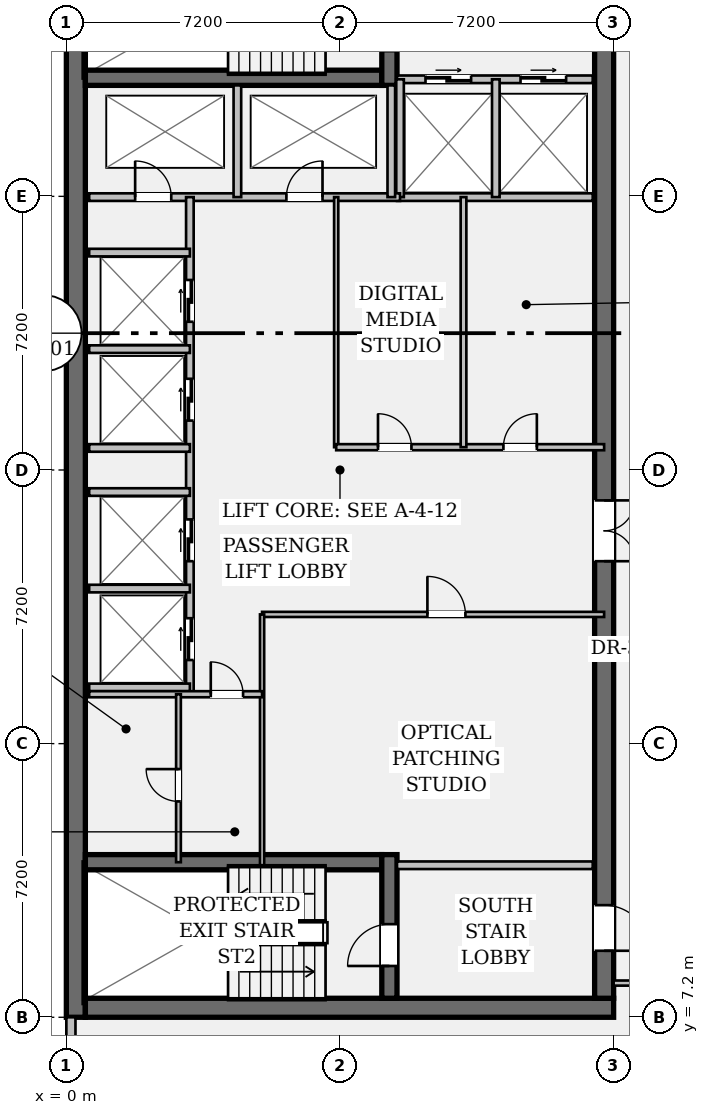
"""IFC4 building model, lengths in metres.
Left out: names, types, materials, properties, quantities, classifications, styles, units other than length and angle.
Written with IfcOpenShell. Run it as: python <this file> out.ifc"""

import sys

from ifc_helpers import new_model, si_unit, direction, frame, frame_2d, origin, place, context, subcontext, project, spatial, rectangle, extrude, element, fill, save


model = new_model("IFC4")
c1 = context("Model", 3, precision=1e-05, world=origin(), true_north=direction((0.0, 1.0)))
c2 = subcontext(c1, "Body", "Model", "MODEL_VIEW")
j1 = project(units=[si_unit("LENGTHUNIT", "METRE"), si_unit("PLANEANGLEUNIT", "RADIAN")], contexts=[c1])
p1 = place(None, origin())
s1 = spatial("IfcSite", under=j1, at=p1, CompositionType="ELEMENT")
p2 = place(p1, origin())
s2 = spatial("IfcBuilding", under=s1, at=p2, CompositionType="ELEMENT")
p3 = place(p2, frame((0.0, 0.0, 225.75)))
s3 = spatial("IfcBuildingStorey", under=s2, at=p3, CompositionType="ELEMENT", Elevation=225.75)
p4 = place(p3, frame((0.25, 7.2, 0.0), z_axis=(0.0, 0.0, 1.0), x_axis=(0.0, 1.0, 0.0)))
e1 = element("IfcWall", 1, at=p4, inside=s3, PredefinedType="SHEAR", context=c2, shape_type="SweptSolid", body=[
    extrude(rectangle(XDim=28.8, YDim=0.5, at=frame_2d((14.4, 0.0))), origin(), (0.0, 0.0, 1.0), 3.24),
])
p5 = place(p3, frame((0.5, 7.45, 0.0), z_axis=(0.0, 0.0, 1.0), x_axis=(1.0, 0.0, 0.0)))
e2 = element("IfcWall", 2, at=p5, inside=s3, PredefinedType="SHEAR", context=c2, shape_type="SweptSolid", body=[
    extrude(rectangle(XDim=13.9, YDim=0.5, at=frame_2d((6.95, 0.0))), origin(), (0.0, 0.0, 1.0), 3.24),
])
p6 = place(p3, frame((14.15, 35.5, 0.0), z_axis=(0.0, 0.0, 1.0), x_axis=(0.0, -1.0, 0.0)))
e3 = element("IfcWall", 3, at=p6, inside=s3, PredefinedType="SHEAR", context=c2, shape_type="SweptSolid", body=[
    extrude(rectangle(XDim=27.8, YDim=0.5, at=frame_2d((13.9, 0.0))), origin(), (0.0, 0.0, 1.0), 3.24),
])
p7 = place(p6, frame((1.4, 0.0, 0.0)))
e4 = element("IfcOpeningElement", 4, at=p7, cuts=e3, PredefinedType="OPENING", context=c2, shape_type="SweptSolid", body=[
    extrude(rectangle(XDim=1.2, YDim=2.15, at=frame_2d((0.6, 1.075))), frame((0.0, 0.262, 0.0), z_axis=(0.0, -1.0, 0.0), x_axis=(1.0, 0.0, 0.0)), (0.0, 0.0, 1.0), 0.524),
])
p8 = place(p6, frame((25.35, 0.0, 0.0)))
e5 = element("IfcOpeningElement", 5, at=p8, cuts=e3, PredefinedType="OPENING", context=c2, shape_type="SweptSolid", body=[
    extrude(rectangle(XDim=1.2, YDim=2.15, at=frame_2d((0.6, 1.075))), frame((0.0, 0.262, 0.0), z_axis=(0.0, -1.0, 0.0), x_axis=(1.0, 0.0, 0.0)), (0.0, 0.0, 1.0), 0.524),
])
p9 = place(p6, frame((14.7, 0.0, 0.0)))
e6 = element("IfcOpeningElement", 6, at=p9, cuts=e3, PredefinedType="OPENING", context=c2, shape_type="SweptSolid", body=[
    extrude(rectangle(XDim=1.6, YDim=2.2, at=frame_2d((0.8, 1.1))), frame((0.0, 0.262, 0.0), z_axis=(0.0, -1.0, 0.0), x_axis=(1.0, 0.0, 0.0)), (0.0, 0.0, 1.0), 0.524),
])
for number, where, z_axis, x_axis in (
    (7, (0.5, 31.92, 0.0), (0.0, 0.0, 1.0), (1.0, 0.0, 0.0)),
    (8, (0.5, 11.28, 0.0), (0.0, 0.0, 1.0), (1.0, 0.0, 0.0)),
):
    element("IfcWall", number, at=place(p3, frame(where, z_axis=z_axis, x_axis=x_axis)), inside=s3, PredefinedType="SHEAR", context=c2, shape_type="SweptSolid", body=[
        extrude(rectangle(XDim=7.8, YDim=0.4, at=frame_2d((3.9, 0.0))), origin(), (0.0, 0.0, 1.0), 3.24),
    ])
p10 = place(p3, frame((8.5, 31.72, 0.0), z_axis=(0.0, 0.0, 1.0), x_axis=(0.0, 1.0, 0.0)))
e9 = element("IfcWall", 9, at=p10, inside=s3, PredefinedType="SHEAR", context=c2, shape_type="SweptSolid", body=[
    extrude(rectangle(XDim=3.78, YDim=0.4, at=frame_2d((1.89, 0.0))), origin(), (0.0, 0.0, 1.0), 3.24),
])
p11 = place(p10, frame((0.9, 0.0, 0.0)))
e10 = element("IfcOpeningElement", 10, at=p11, cuts=e9, PredefinedType="OPENING", context=c2, shape_type="SweptSolid", body=[
    extrude(rectangle(XDim=1.1, YDim=2.15, at=frame_2d((0.55, 1.075))), frame((0.0, 0.212, 0.0), z_axis=(0.0, -1.0, 0.0), x_axis=(1.0, 0.0, 0.0)), (0.0, 0.0, 1.0), 0.424),
])
p12 = place(p3, frame((8.5, 7.7, 0.0), z_axis=(0.0, 0.0, 1.0), x_axis=(0.0, 1.0, 0.0)))
e11 = element("IfcWall", 11, at=p12, inside=s3, PredefinedType="SHEAR", context=c2, shape_type="SweptSolid", body=[
    extrude(rectangle(XDim=3.78, YDim=0.4, at=frame_2d((1.89, 0.0))), origin(), (0.0, 0.0, 1.0), 3.24),
])
p13 = place(p12, frame((0.85, 0.0, 0.0)))
e12 = element("IfcOpeningElement", 12, at=p13, cuts=e11, PredefinedType="OPENING", context=c2, shape_type="SweptSolid", body=[
    extrude(rectangle(XDim=1.1, YDim=2.15, at=frame_2d((0.55, 1.075))), frame((0.0, 0.212, 0.0), z_axis=(0.0, -1.0, 0.0), x_axis=(1.0, 0.0, 0.0)), (0.0, 0.0, 1.0), 0.424),
])
p14 = place(p3, frame((0.12, 6.03, 0.0), z_axis=(0.0, 0.0, 1.0), x_axis=(0.0, 1.0, 0.0)))
e13 = element("IfcWall", 13, at=p14, inside=s3, PredefinedType="STANDARD", context=c2, shape_type="SweptSolid", body=[
    extrude(rectangle(XDim=1.17, YDim=0.24, at=frame_2d((0.585, 0.0))), origin(), (0.0, 0.0, 1.0), 3.24),
])
p15 = place(p3, frame((8.7, 31.88, 0.0), z_axis=(0.0, 0.0, 1.0), x_axis=(1.0, 0.0, 0.0)))
e14 = element("IfcWall", 14, at=p15, inside=s3, PredefinedType="PARTITIONING", context=c2, shape_type="SweptSolid", body=[
    extrude(rectangle(XDim=5.15, YDim=0.2, at=frame_2d((2.575, 0.0))), origin(), (0.0, 0.0, 1.0), 3.24),
])
p16 = place(p15, frame((0.75, 0.0, 0.0)))
e15 = element("IfcOpeningElement", 15, at=p16, cuts=e14, PredefinedType="OPENING", context=c2, shape_type="SweptSolid", body=[
    extrude(rectangle(XDim=1.2, YDim=2.2, at=frame_2d((0.6, 1.1))), frame((0.0, 0.112, 0.0), z_axis=(0.0, -1.0, 0.0), x_axis=(1.0, 0.0, 0.0)), (0.0, 0.0, 1.0), 0.224),
])
p17 = place(p15, frame((3.25, 0.0, 0.0)))
e16 = element("IfcOpeningElement", 16, at=p17, cuts=e14, PredefinedType="OPENING", context=c2, shape_type="SweptSolid", body=[
    extrude(rectangle(XDim=1.2, YDim=2.2, at=frame_2d((0.6, 1.1))), frame((0.0, 0.112, 0.0), z_axis=(0.0, -1.0, 0.0), x_axis=(1.0, 0.0, 0.0)), (0.0, 0.0, 1.0), 0.224),
])
for number, where, z_axis, x_axis in (
    (17, (8.7, 11.2, 0.0), (0.0, 0.0, 1.0), (1.0, 0.0, 0.0)),
    (18, (8.7, 28.78, 0.0), (0.0, 0.0, 1.0), (1.0, 0.0, 0.0)),
):
    element("IfcWall", number, at=place(p3, frame(where, z_axis=z_axis, x_axis=x_axis)), inside=s3, PredefinedType="PARTITIONING", context=c2, shape_type="SweptSolid", body=[
        extrude(rectangle(XDim=5.15, YDim=0.2, at=frame_2d((2.575, 0.0))), origin(), (0.0, 0.0, 1.0), 3.24),
    ])
for number, where, z_axis, x_axis in (
    (19, (8.78, 28.78, 0.0), (0.0, 0.0, 1.0), (0.0, 1.0, 0.0)),
    (20, (11.3, 28.78, 0.0), (0.0, 0.0, 1.0), (0.0, 1.0, 0.0)),
):
    element("IfcWall", number, at=place(p3, frame(where, z_axis=z_axis, x_axis=x_axis)), inside=s3, PredefinedType="PARTITIONING", context=c2, shape_type="SweptSolid", body=[
        extrude(rectangle(XDim=3.1, YDim=0.2, at=frame_2d((1.55, 0.0))), origin(), (0.0, 0.0, 1.0), 3.24),
    ])
p18 = place(p3, frame((0.6, 28.78, 0.0), z_axis=(0.0, 0.0, 1.0), x_axis=(1.0, 0.0, 0.0)))
e21 = element("IfcWall", 21, at=p18, inside=s3, PredefinedType="PARTITIONING", context=c2, shape_type="SweptSolid", body=[
    extrude(rectangle(XDim=8.18, YDim=0.2, at=frame_2d((4.09, 0.0))), origin(), (0.0, 0.0, 1.0), 3.24),
])
p19 = place(p18, frame((1.21, 0.0, 0.0)))
e22 = element("IfcOpeningElement", 22, at=p19, cuts=e21, PredefinedType="OPENING", context=c2, shape_type="SweptSolid", body=[
    extrude(rectangle(XDim=0.95, YDim=2.15, at=frame_2d((0.475, 1.075))), frame((0.0, 0.112, 0.0), z_axis=(0.0, -1.0, 0.0), x_axis=(1.0, 0.0, 0.0)), (0.0, 0.0, 1.0), 0.224),
])
p20 = place(p18, frame((5.19, 0.0, 0.0)))
e23 = element("IfcOpeningElement", 23, at=p20, cuts=e21, PredefinedType="OPENING", context=c2, shape_type="SweptSolid", body=[
    extrude(rectangle(XDim=0.95, YDim=2.15, at=frame_2d((0.475, 1.075))), frame((0.0, 0.112, 0.0), z_axis=(0.0, -1.0, 0.0), x_axis=(1.0, 0.0, 0.0)), (0.0, 0.0, 1.0), 0.224),
])
for number, where, z_axis, x_axis in (
    (24, (4.5, 28.78, 0.0), (0.0, 0.0, 1.0), (0.0, 1.0, 0.0)),
    (25, (8.55, 28.78, 0.0), (0.0, 0.0, 1.0), (0.0, 1.0, 0.0)),
):
    element("IfcWall", number, at=place(p3, frame(where, z_axis=z_axis, x_axis=x_axis)), inside=s3, PredefinedType="PARTITIONING", context=c2, shape_type="SweptSolid", body=[
        extrude(rectangle(XDim=2.94, YDim=0.2, at=frame_2d((1.47, 0.0))), origin(), (0.0, 0.0, 1.0), 3.24),
    ])
p21 = place(p3, frame((3.25, 15.7, 0.0), z_axis=(0.0, 0.0, 1.0), x_axis=(0.0, 1.0, 0.0)))
e26 = element("IfcWall", 26, at=p21, inside=s3, PredefinedType="PARTITIONING", context=c2, shape_type="SweptSolid", body=[
    extrude(rectangle(XDim=13.08, YDim=0.2, at=frame_2d((6.54, 0.0))), origin(), (0.0, 0.0, 1.0), 3.24),
])
p22 = place(p21, frame((0.9, 0.0, 0.0)))
e27 = element("IfcOpeningElement", 27, at=p22, cuts=e26, PredefinedType="OPENING", context=c2, shape_type="SweptSolid", body=[
    extrude(rectangle(XDim=1.1, YDim=2.2, at=frame_2d((0.55, 1.1))), frame((0.0, 0.112, 0.0), z_axis=(0.0, -1.0, 0.0), x_axis=(1.0, 0.0, 0.0)), (0.0, 0.0, 1.0), 0.224),
])
p23 = place(p21, frame((3.5, 0.0, 0.0)))
e28 = element("IfcOpeningElement", 28, at=p23, cuts=e26, PredefinedType="OPENING", context=c2, shape_type="SweptSolid", body=[
    extrude(rectangle(XDim=1.1, YDim=2.2, at=frame_2d((0.55, 1.1))), frame((0.0, 0.112, 0.0), z_axis=(0.0, -1.0, 0.0), x_axis=(1.0, 0.0, 0.0)), (0.0, 0.0, 1.0), 0.224),
])
p24 = place(p21, frame((7.2, 0.0, 0.0)))
e29 = element("IfcOpeningElement", 29, at=p24, cuts=e26, PredefinedType="OPENING", context=c2, shape_type="SweptSolid", body=[
    extrude(rectangle(XDim=1.1, YDim=2.2, at=frame_2d((0.55, 1.1))), frame((0.0, 0.112, 0.0), z_axis=(0.0, -1.0, 0.0), x_axis=(1.0, 0.0, 0.0)), (0.0, 0.0, 1.0), 0.224),
])
p25 = place(p21, frame((9.8, 0.0, 0.0)))
e30 = element("IfcOpeningElement", 30, at=p25, cuts=e26, PredefinedType="OPENING", context=c2, shape_type="SweptSolid", body=[
    extrude(rectangle(XDim=1.1, YDim=2.2, at=frame_2d((0.55, 1.1))), frame((0.0, 0.112, 0.0), z_axis=(0.0, -1.0, 0.0), x_axis=(1.0, 0.0, 0.0)), (0.0, 0.0, 1.0), 0.224),
])
for number, where, z_axis, x_axis in (
    (31, (0.6, 15.88, 0.0), (0.0, 0.0, 1.0), (1.0, 0.0, 0.0)),
    (32, (0.6, 18.48, 0.0), (0.0, 0.0, 1.0), (1.0, 0.0, 0.0)),
    (33, (0.6, 22.18, 0.0), (0.0, 0.0, 1.0), (1.0, 0.0, 0.0)),
    (34, (0.6, 24.78, 0.0), (0.0, 0.0, 1.0), (1.0, 0.0, 0.0)),
    (35, (0.6, 21.02, 0.0), (0.0, 0.0, 1.0), (1.0, 0.0, 0.0)),
    (36, (0.6, 27.32, 0.0), (0.0, 0.0, 1.0), (1.0, 0.0, 0.0)),
):
    element("IfcWall", number, at=place(p3, frame(where, z_axis=z_axis, x_axis=x_axis)), inside=s3, PredefinedType="PARTITIONING", context=c2, shape_type="SweptSolid", body=[
        extrude(rectangle(XDim=2.65, YDim=0.2, at=frame_2d((1.325, 0.0))), origin(), (0.0, 0.0, 1.0), 3.24),
    ])
p26 = place(p3, frame((7.1, 22.2, 0.0), z_axis=(0.0, 0.0, 1.0), x_axis=(0.0, 1.0, 0.0)))
e37 = element("IfcWall", 37, at=p26, inside=s3, PredefinedType="PARTITIONING", context=c2, shape_type="SweptSolid", body=[
    extrude(rectangle(XDim=6.58, YDim=0.11, at=frame_2d((3.29, 0.0))), origin(), (0.0, 0.0, 1.0), 3.24),
])
p27 = place(p3, frame((7.1, 22.2, 0.0), z_axis=(0.0, 0.0, 1.0), x_axis=(1.0, 0.0, 0.0)))
e38 = element("IfcWall", 38, at=p27, inside=s3, PredefinedType="PARTITIONING", context=c2, shape_type="SweptSolid", body=[
    extrude(rectangle(XDim=7.05, YDim=0.16, at=frame_2d((3.525, 0.0))), origin(), (0.0, 0.0, 1.0), 3.24),
])
p28 = place(p27, frame((1.1, 0.0, 0.0)))
e39 = element("IfcOpeningElement", 39, at=p28, cuts=e38, PredefinedType="OPENING", context=c2, shape_type="SweptSolid", body=[
    extrude(rectangle(XDim=0.88, YDim=2.15, at=frame_2d((0.44, 1.075))), frame((0.0, 0.092, 0.0), z_axis=(0.0, -1.0, 0.0), x_axis=(1.0, 0.0, 0.0)), (0.0, 0.0, 1.0), 0.184),
])
p29 = place(p27, frame((4.4, 0.0, 0.0)))
e40 = element("IfcOpeningElement", 40, at=p29, cuts=e38, PredefinedType="OPENING", context=c2, shape_type="SweptSolid", body=[
    extrude(rectangle(XDim=0.88, YDim=2.15, at=frame_2d((0.44, 1.075))), frame((0.0, 0.092, 0.0), z_axis=(0.0, -1.0, 0.0), x_axis=(1.0, 0.0, 0.0)), (0.0, 0.0, 1.0), 0.184),
])
p30 = place(p3, frame((10.45, 22.2, 0.0), z_axis=(0.0, 0.0, 1.0), x_axis=(0.0, 1.0, 0.0)))
e41 = element("IfcWall", 41, at=p30, inside=s3, PredefinedType="PARTITIONING", context=c2, shape_type="SweptSolid", body=[
    extrude(rectangle(XDim=6.58, YDim=0.15, at=frame_2d((3.29, 0.0))), origin(), (0.0, 0.0, 1.0), 3.24),
])
p31 = place(p3, frame((5.15, 17.8, 0.0), z_axis=(0.0, 0.0, 1.0), x_axis=(1.0, 0.0, 0.0)))
e42 = element("IfcWall", 42, at=p31, inside=s3, PredefinedType="PARTITIONING", context=c2, shape_type="SweptSolid", body=[
    extrude(rectangle(XDim=9.0, YDim=0.135, at=frame_2d((4.5, 0.0))), origin(), (0.0, 0.0, 1.0), 3.24),
])
p32 = place(p31, frame((4.35, 0.0, 0.0)))
e43 = element("IfcOpeningElement", 43, at=p32, cuts=e42, PredefinedType="OPENING", context=c2, shape_type="SweptSolid", body=[
    extrude(rectangle(XDim=1.0, YDim=2.15, at=frame_2d((0.5, 1.075))), frame((0.0, 0.08, 0.0), z_axis=(0.0, -1.0, 0.0), x_axis=(1.0, 0.0, 0.0)), (0.0, 0.0, 1.0), 0.159),
])
p33 = place(p3, frame((5.15, 11.2, 0.0), z_axis=(0.0, 0.0, 1.0), x_axis=(0.0, 1.0, 0.0)))
e44 = element("IfcWall", 44, at=p33, inside=s3, PredefinedType="PARTITIONING", context=c2, shape_type="SweptSolid", body=[
    extrude(rectangle(XDim=6.6, YDim=0.11, at=frame_2d((3.3, 0.0))), origin(), (0.0, 0.0, 1.0), 3.24),
])
p34 = place(p3, frame((0.6, 15.7, 0.0), z_axis=(0.0, 0.0, 1.0), x_axis=(1.0, 0.0, 0.0)))
e45 = element("IfcWall", 45, at=p34, inside=s3, PredefinedType="PARTITIONING", context=c2, shape_type="SweptSolid", body=[
    extrude(rectangle(XDim=4.55, YDim=0.16, at=frame_2d((2.275, 0.0))), origin(), (0.0, 0.0, 1.0), 3.24),
])
p35 = place(p34, frame((3.2, 0.0, 0.0)))
e46 = element("IfcOpeningElement", 46, at=p35, cuts=e45, PredefinedType="OPENING", context=c2, shape_type="SweptSolid", body=[
    extrude(rectangle(XDim=0.85, YDim=2.15, at=frame_2d((0.425, 1.075))), frame((0.0, 0.092, 0.0), z_axis=(0.0, -1.0, 0.0), x_axis=(1.0, 0.0, 0.0)), (0.0, 0.0, 1.0), 0.184),
])
p36 = place(p3, frame((2.95, 11.28, 0.0), z_axis=(0.0, 0.0, 1.0), x_axis=(0.0, 1.0, 0.0)))
e47 = element("IfcWall", 47, at=p36, inside=s3, PredefinedType="PARTITIONING", context=c2, shape_type="SweptSolid", body=[
    extrude(rectangle(XDim=4.42, YDim=0.125, at=frame_2d((2.21, 0.0))), origin(), (0.0, 0.0, 1.0), 3.24),
])
p37 = place(p36, frame((1.6, 0.0, 0.0)))
e48 = element("IfcOpeningElement", 48, at=p37, cuts=e47, PredefinedType="OPENING", context=c2, shape_type="SweptSolid", body=[
    extrude(rectangle(XDim=0.85, YDim=2.15, at=frame_2d((0.425, 1.075))), frame((0.0, 0.074, 0.0), z_axis=(0.0, -1.0, 0.0), x_axis=(1.0, 0.0, 0.0)), (0.0, 0.0, 1.0), 0.149),
])
p38 = place(p3, frame((14.4, 8.1, 0.0), z_axis=(0.0, 0.0, 1.0), x_axis=(1.0, 0.0, 0.0)))
e49 = element("IfcWall", 49, at=p38, inside=s3, PredefinedType="PARTITIONING", context=c2, shape_type="SweptSolid", body=[
    extrude(rectangle(XDim=2.95, YDim=0.135, at=frame_2d((1.475, 0.0))), origin(), (0.0, 0.0, 1.0), 2.808),
])
p39 = place(p38, frame((0.95, 0.0, 0.0)))
e50 = element("IfcOpeningElement", 50, at=p39, cuts=e49, PredefinedType="OPENING", context=c2, shape_type="SweptSolid", body=[
    extrude(rectangle(XDim=0.88, YDim=2.15, at=frame_2d((0.44, 1.075))), frame((0.0, 0.08, 0.0), z_axis=(0.0, -1.0, 0.0), x_axis=(1.0, 0.0, 0.0)), (0.0, 0.0, 1.0), 0.159),
])
p40 = place(p13, origin())
e51 = element("IfcDoor", 51, at=p40, inside=s3, OperationType="SINGLE_SWING_LEFT", PredefinedType="DOOR", context=c2, shape_type="SweptSolid", body=[
    extrude(rectangle(XDim=1.1, YDim=2.15, at=frame_2d((0.55, 1.075))), frame((0.0, 0.025, 0.0), z_axis=(0.0, -1.0, 0.0), x_axis=(1.0, 0.0, 0.0)), (0.0, 0.0, 1.0), 0.05),
])
fill(e12, e51)
p41 = place(p8, origin())
e52 = element("IfcDoor", 52, at=p41, inside=s3, OperationType="SINGLE_SWING_RIGHT", PredefinedType="DOOR", context=c2, shape_type="SweptSolid", body=[
    extrude(rectangle(XDim=1.2, YDim=2.15, at=frame_2d((0.6, 1.075))), frame((0.0, 0.025, 0.0), z_axis=(0.0, -1.0, 0.0), x_axis=(1.0, 0.0, 0.0)), (0.0, 0.0, 1.0), 0.05),
])
fill(e5, e52)
p42 = place(p16, origin())
e53 = element("IfcDoor", 53, at=p42, inside=s3, OperationType="DOUBLE_DOOR_SLIDING", PredefinedType="DOOR", context=c2, shape_type="SweptSolid", body=[
    extrude(rectangle(XDim=1.2, YDim=2.2, at=frame_2d((0.6, 1.1))), frame((0.0, 0.025, 0.0), z_axis=(0.0, -1.0, 0.0), x_axis=(1.0, 0.0, 0.0)), (0.0, 0.0, 1.0), 0.05),
])
fill(e15, e53)
p43 = place(p17, origin())
e54 = element("IfcDoor", 54, at=p43, inside=s3, OperationType="DOUBLE_DOOR_SLIDING", PredefinedType="DOOR", context=c2, shape_type="SweptSolid", body=[
    extrude(rectangle(XDim=1.2, YDim=2.2, at=frame_2d((0.6, 1.1))), frame((0.0, 0.025, 0.0), z_axis=(0.0, -1.0, 0.0), x_axis=(1.0, 0.0, 0.0)), (0.0, 0.0, 1.0), 0.05),
])
fill(e16, e54)
p44 = place(p19, origin())
e55 = element("IfcDoor", 55, at=p44, inside=s3, OperationType="SINGLE_SWING_LEFT", PredefinedType="DOOR", context=c2, shape_type="SweptSolid", body=[
    extrude(rectangle(XDim=0.95, YDim=2.15, at=frame_2d((0.475, 1.075))), frame((0.0, 0.025, 0.0), z_axis=(0.0, -1.0, 0.0), x_axis=(1.0, 0.0, 0.0)), (0.0, 0.0, 1.0), 0.05),
])
fill(e22, e55)
p45 = place(p20, origin())
e56 = element("IfcDoor", 56, at=p45, inside=s3, OperationType="SINGLE_SWING_RIGHT", PredefinedType="DOOR", context=c2, shape_type="SweptSolid", body=[
    extrude(rectangle(XDim=0.95, YDim=2.15, at=frame_2d((0.475, 1.075))), frame((0.0, 0.025, 0.0), z_axis=(0.0, -1.0, 0.0), x_axis=(1.0, 0.0, 0.0)), (0.0, 0.0, 1.0), 0.05),
])
fill(e23, e56)
p46 = place(p9, origin())
e57 = element("IfcDoor", 57, at=p46, inside=s3, OperationType="DOUBLE_DOOR_SINGLE_SWING", PredefinedType="DOOR", context=c2, shape_type="SweptSolid", body=[
    extrude(rectangle(XDim=1.6, YDim=2.2, at=frame_2d((0.8, 1.1))), frame((0.0, 0.025, 0.0), z_axis=(0.0, -1.0, 0.0), x_axis=(1.0, 0.0, 0.0)), (0.0, 0.0, 1.0), 0.05),
])
fill(e6, e57)
p47 = place(p22, origin())
e58 = element("IfcDoor", 58, at=p47, inside=s3, OperationType="DOUBLE_DOOR_SLIDING", PredefinedType="DOOR", context=c2, shape_type="SweptSolid", body=[
    extrude(rectangle(XDim=1.1, YDim=2.2, at=frame_2d((0.55, 1.1))), frame((0.0, 0.025, 0.0), z_axis=(0.0, -1.0, 0.0), x_axis=(1.0, 0.0, 0.0)), (0.0, 0.0, 1.0), 0.05),
])
fill(e27, e58)
p48 = place(p23, origin())
e59 = element("IfcDoor", 59, at=p48, inside=s3, OperationType="DOUBLE_DOOR_SLIDING", PredefinedType="DOOR", context=c2, shape_type="SweptSolid", body=[
    extrude(rectangle(XDim=1.1, YDim=2.2, at=frame_2d((0.55, 1.1))), frame((0.0, 0.025, 0.0), z_axis=(0.0, -1.0, 0.0), x_axis=(1.0, 0.0, 0.0)), (0.0, 0.0, 1.0), 0.05),
])
fill(e28, e59)
p49 = place(p24, origin())
e60 = element("IfcDoor", 60, at=p49, inside=s3, OperationType="DOUBLE_DOOR_SLIDING", PredefinedType="DOOR", context=c2, shape_type="SweptSolid", body=[
    extrude(rectangle(XDim=1.1, YDim=2.2, at=frame_2d((0.55, 1.1))), frame((0.0, 0.025, 0.0), z_axis=(0.0, -1.0, 0.0), x_axis=(1.0, 0.0, 0.0)), (0.0, 0.0, 1.0), 0.05),
])
fill(e29, e60)
p50 = place(p25, origin())
e61 = element("IfcDoor", 61, at=p50, inside=s3, OperationType="DOUBLE_DOOR_SLIDING", PredefinedType="DOOR", context=c2, shape_type="SweptSolid", body=[
    extrude(rectangle(XDim=1.1, YDim=2.2, at=frame_2d((0.55, 1.1))), frame((0.0, 0.025, 0.0), z_axis=(0.0, -1.0, 0.0), x_axis=(1.0, 0.0, 0.0)), (0.0, 0.0, 1.0), 0.05),
])
fill(e30, e61)
p51 = place(p28, origin())
e62 = element("IfcDoor", 62, at=p51, inside=s3, OperationType="SINGLE_SWING_LEFT", PredefinedType="DOOR", context=c2, shape_type="SweptSolid", body=[
    extrude(rectangle(XDim=0.88, YDim=2.15, at=frame_2d((0.44, 1.075))), frame((0.0, 0.025, 0.0), z_axis=(0.0, -1.0, 0.0), x_axis=(1.0, 0.0, 0.0)), (0.0, 0.0, 1.0), 0.05),
])
fill(e39, e62)
p52 = place(p29, origin())
e63 = element("IfcDoor", 63, at=p52, inside=s3, OperationType="SINGLE_SWING_RIGHT", PredefinedType="DOOR", context=c2, shape_type="SweptSolid", body=[
    extrude(rectangle(XDim=0.88, YDim=2.15, at=frame_2d((0.44, 1.075))), frame((0.0, 0.025, 0.0), z_axis=(0.0, -1.0, 0.0), x_axis=(1.0, 0.0, 0.0)), (0.0, 0.0, 1.0), 0.05),
])
fill(e40, e63)
p53 = place(p32, origin())
e64 = element("IfcDoor", 64, at=p53, inside=s3, OperationType="SINGLE_SWING_LEFT", PredefinedType="DOOR", context=c2, shape_type="SweptSolid", body=[
    extrude(rectangle(XDim=1.0, YDim=2.15, at=frame_2d((0.5, 1.075))), frame((0.0, 0.025, 0.0), z_axis=(0.0, -1.0, 0.0), x_axis=(1.0, 0.0, 0.0)), (0.0, 0.0, 1.0), 0.05),
])
fill(e43, e64)
p54 = place(p35, origin())
e65 = element("IfcDoor", 65, at=p54, inside=s3, OperationType="SINGLE_SWING_LEFT", PredefinedType="DOOR", context=c2, shape_type="SweptSolid", body=[
    extrude(rectangle(XDim=0.85, YDim=2.15, at=frame_2d((0.425, 1.075))), frame((0.0, 0.025, 0.0), z_axis=(0.0, -1.0, 0.0), x_axis=(1.0, 0.0, 0.0)), (0.0, 0.0, 1.0), 0.05),
])
fill(e46, e65)
p55 = place(p37, origin())
e66 = element("IfcDoor", 66, at=p55, inside=s3, OperationType="SINGLE_SWING_RIGHT", PredefinedType="DOOR", context=c2, shape_type="SweptSolid", body=[
    extrude(rectangle(XDim=0.85, YDim=2.15, at=frame_2d((0.425, 1.075))), frame((0.0, 0.025, 0.0), z_axis=(0.0, -1.0, 0.0), x_axis=(1.0, 0.0, 0.0)), (0.0, 0.0, 1.0), 0.05),
])
fill(e48, e66)
save(model, sys.argv[1])
